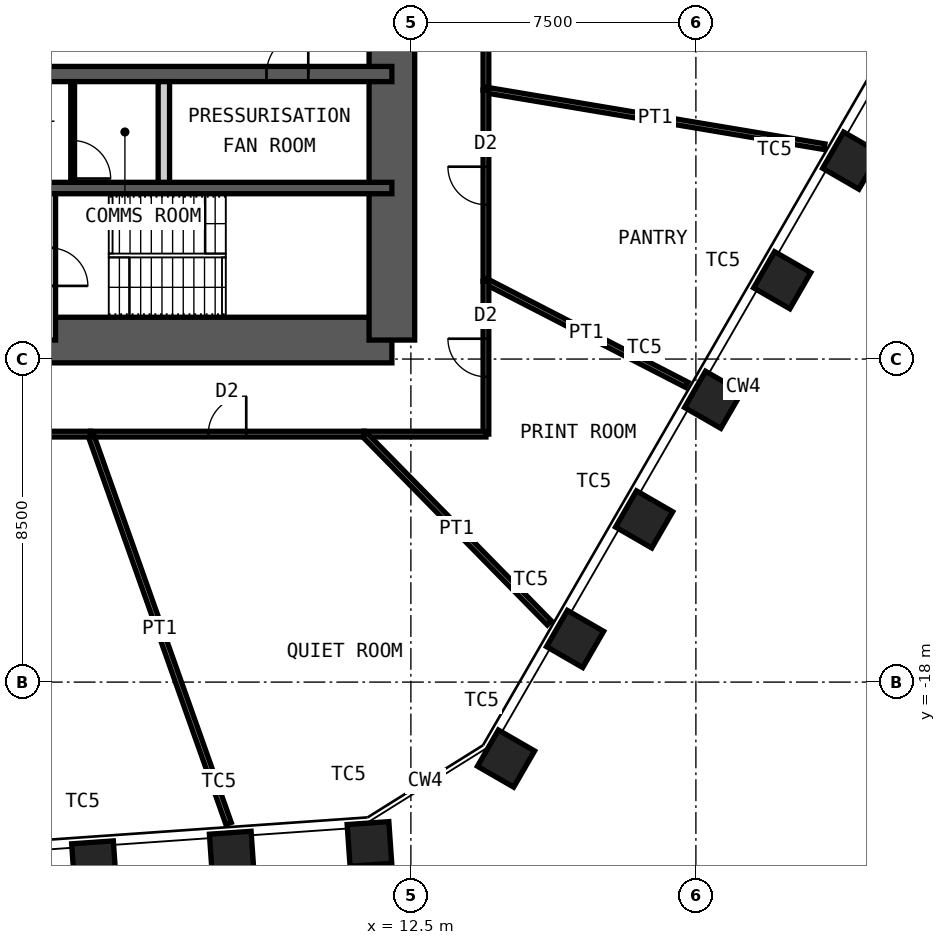
"""IFC4 building model, lengths in metres.
Left out: names, types, materials, properties, quantities, classifications, styles, units other than length and angle.
Written with IfcOpenShell. Run it as: python <this file> out.ifc"""

import sys

from ifc_helpers import new_model, si_unit, direction, frame, frame_2d, origin, origin_2d, place, context, subcontext, project, spatial, rectangle, hollow_rectangle, extrude, element, fill, save


model = new_model("IFC4")
c1 = context("Model", 3, precision=1e-05, world=origin(), true_north=direction((0.0, 1.0)))
c2 = subcontext(c1, "Body", "Model", "MODEL_VIEW")
j1 = project(units=[si_unit("LENGTHUNIT", "METRE"), si_unit("PLANEANGLEUNIT", "RADIAN")], contexts=[c1])
p1 = place(None, origin())
s1 = spatial("IfcSite", under=j1, at=p1, CompositionType="ELEMENT")
p2 = place(p1, origin())
s2 = spatial("IfcBuilding", under=s1, at=p2, CompositionType="ELEMENT")
p3 = place(p2, frame((0.0, 0.0, 193.0)))
s3 = spatial("IfcBuildingStorey", under=s2, at=p3, CompositionType="ELEMENT", Elevation=193.0)
for number, where, z_axis, x_axis in (
    (1, (24.088, -4.279, 0.0), (0.0, 0.0, 1.0), (0.5, 0.866, 0.0)),
    (2, (22.271, -7.426, 0.0), (0.0, 0.0, 1.0), (0.5, 0.866, 0.0)),
    (3, (20.454, -10.572, 0.0), (0.0, 0.0, 1.0), (0.5, 0.866, 0.0)),
    (4, (18.637, -13.719, 0.0), (0.0, 0.0, 1.0), (0.5, 0.866, 0.0)),
    (5, (16.821, -16.866, 0.0), (0.0, 0.0, 1.0), (0.5, 0.866, 0.0)),
    (6, (15.004, -20.012, 0.0), (0.0, 0.0, 1.0), (0.5, 0.866, 0.0)),
    (7, (11.41, -22.258, 0.0), (0.0, 0.0, 1.0), (0.998, 0.07, 0.0)),
    (8, (7.785, -22.512, 0.0), (0.0, 0.0, 1.0), (0.998, 0.07, 0.0)),
    (9, (4.16, -22.765, 0.0), (0.0, 0.0, 1.0), (0.998, 0.07, 0.0)),
):
    element("IfcColumn", number, at=place(p3, frame(where, z_axis=z_axis, x_axis=x_axis)), inside=s3, PredefinedType="COLUMN", context=c2, shape_type="SweptSolid", body=[
        extrude(hollow_rectangle(XDim=1.1, YDim=1.1, WallThickness=0.07, at=origin_2d()), origin(), (0.0, 0.0, 1.0), 4.2),
    ])
p4 = place(p3, frame((-12.0, -9.0, 0.0), z_axis=(0.0, 0.0, 1.0), x_axis=(1.0, 0.0, 0.0)))
e10 = element("IfcWall", 10, at=p4, inside=s3, PredefinedType="SHEAR", context=c2, shape_type="SweptSolid", body=[
    extrude(rectangle(XDim=24.0, YDim=1.2, at=frame_2d((12.0, 0.0))), origin(), (0.0, 0.0, 1.0), 4.2),
])
p5 = place(p4, frame((1.35, 0.0, 0.0)))
e11 = element("IfcOpeningElement", 11, at=p5, cuts=e10, PredefinedType="OPENING", context=c2, shape_type="SweptSolid", body=[
    extrude(rectangle(XDim=1.0, YDim=2.1, at=frame_2d((0.5, 1.05))), frame((0.0, 0.61, 0.0), z_axis=(0.0, -1.0, 0.0), x_axis=(1.0, 0.0, 0.0)), (0.0, 0.0, 1.0), 1.22),
])
p6 = place(p4, frame((5.325, 0.0, 0.0)))
e12 = element("IfcOpeningElement", 12, at=p6, cuts=e10, PredefinedType="OPENING", context=c2, shape_type="SweptSolid", body=[
    extrude(rectangle(XDim=1.15, YDim=2.1, at=frame_2d((0.575, 1.05))), frame((0.0, 0.61, 0.0), z_axis=(0.0, -1.0, 0.0), x_axis=(1.0, 0.0, 0.0)), (0.0, 0.0, 1.0), 1.22),
])
p7 = place(p4, frame((12.6, 0.0, 0.0)))
e13 = element("IfcOpeningElement", 13, at=p7, cuts=e10, PredefinedType="OPENING", context=c2, shape_type="SweptSolid", body=[
    extrude(rectangle(XDim=1.0, YDim=2.1, at=frame_2d((0.5, 1.05))), frame((0.0, 0.61, 0.0), z_axis=(0.0, -1.0, 0.0), x_axis=(1.0, 0.0, 0.0)), (0.0, 0.0, 1.0), 1.22),
])
p8 = place(p3, frame((12.0, -9.0, 0.0), z_axis=(0.0, 0.0, 1.0), x_axis=(0.0, 1.0, 0.0)))
e14 = element("IfcWall", 14, at=p8, inside=s3, PredefinedType="SHEAR", context=c2, shape_type="SweptSolid", body=[
    extrude(rectangle(XDim=18.0, YDim=1.2, at=frame_2d((9.0, 0.0))), origin(), (0.0, 0.0, 1.0), 4.2),
])
p9 = place(p8, frame((8.1, 0.0, 0.0)))
e15 = element("IfcOpeningElement", 15, at=p9, cuts=e14, PredefinedType="OPENING", context=c2, shape_type="SweptSolid", body=[
    extrude(rectangle(XDim=1.8, YDim=2.1, at=frame_2d((0.9, 1.05))), frame((0.0, 0.61, 0.0), z_axis=(0.0, -1.0, 0.0), x_axis=(1.0, 0.0, 0.0)), (0.0, 0.0, 1.0), 1.22),
])
p10 = place(p3, frame((-12.0, -2.0, 0.0), z_axis=(0.0, 0.0, 1.0), x_axis=(1.0, 0.0, 0.0)))
e16 = element("IfcWall", 16, at=p10, inside=s3, PredefinedType="SHEAR", context=c2, shape_type="SweptSolid", body=[
    extrude(rectangle(XDim=24.0, YDim=0.4, at=frame_2d((12.0, 0.0))), origin(), (0.0, 0.0, 1.0), 4.2),
])
p11 = place(p10, frame((1.1, 0.0, 0.0)))
e17 = element("IfcOpeningElement", 17, at=p11, cuts=e16, PredefinedType="OPENING", context=c2, shape_type="SweptSolid", body=[
    extrude(rectangle(XDim=1.1, YDim=2.1, at=frame_2d((0.55, 1.05))), frame((0.0, 0.21, 0.0), z_axis=(0.0, -1.0, 0.0), x_axis=(1.0, 0.0, 0.0)), (0.0, 0.0, 1.0), 0.42),
])
p12 = place(p10, frame((13.55, 0.0, 0.0)))
e18 = element("IfcOpeningElement", 18, at=p12, cuts=e16, PredefinedType="OPENING", context=c2, shape_type="SweptSolid", body=[
    extrude(rectangle(XDim=1.1, YDim=2.1, at=frame_2d((0.55, 1.05))), frame((0.0, 0.21, 0.0), z_axis=(0.0, -1.0, 0.0), x_axis=(1.0, 0.0, 0.0)), (0.0, 0.0, 1.0), 0.42),
])
p13 = place(p10, frame((20.7, 0.0, 0.0)))
e19 = element("IfcOpeningElement", 19, at=p13, cuts=e16, PredefinedType="OPENING", context=c2, shape_type="SweptSolid", body=[
    extrude(rectangle(XDim=1.1, YDim=2.1, at=frame_2d((0.55, 1.05))), frame((0.0, 0.21, 0.0), z_axis=(0.0, -1.0, 0.0), x_axis=(1.0, 0.0, 0.0)), (0.0, 0.0, 1.0), 0.42),
])
p14 = place(p10, frame((4.0, 0.0, 0.0)))
e20 = element("IfcOpeningElement", 20, at=p14, cuts=e16, PredefinedType="OPENING", context=c2, shape_type="SweptSolid", body=[
    extrude(rectangle(XDim=1.0, YDim=2.1, at=frame_2d((0.5, 1.05))), frame((0.0, 0.21, 0.0), z_axis=(0.0, -1.0, 0.0), x_axis=(1.0, 0.0, 0.0)), (0.0, 0.0, 1.0), 0.42),
])
p15 = place(p10, frame((6.8, 0.0, 0.0)))
e21 = element("IfcOpeningElement", 21, at=p15, cuts=e16, PredefinedType="OPENING", context=c2, shape_type="SweptSolid", body=[
    extrude(rectangle(XDim=1.0, YDim=2.1, at=frame_2d((0.5, 1.05))), frame((0.0, 0.21, 0.0), z_axis=(0.0, -1.0, 0.0), x_axis=(1.0, 0.0, 0.0)), (0.0, 0.0, 1.0), 0.42),
])
p16 = place(p3, frame((-12.0, -5.0, 0.0), z_axis=(0.0, 0.0, 1.0), x_axis=(1.0, 0.0, 0.0)))
e22 = element("IfcWall", 22, at=p16, inside=s3, PredefinedType="SHEAR", context=c2, shape_type="SweptSolid", body=[
    extrude(rectangle(XDim=24.0, YDim=0.3, at=frame_2d((12.0, 0.0))), origin(), (0.0, 0.0, 1.0), 4.2),
])
p17 = place(p3, frame((6.0, -4.85, 0.0), z_axis=(0.0, 0.0, 1.0), x_axis=(0.0, 1.0, 0.0)))
e23 = element("IfcWall", 23, at=p17, inside=s3, PredefinedType="PARTITIONING", context=c2, shape_type="SweptSolid", body=[
    extrude(rectangle(XDim=2.65, YDim=0.3, at=frame_2d((1.325, 0.0))), origin(), (0.0, 0.0, 1.0), 3.98),
])
p18 = place(p3, frame((3.0, -9.0, 0.0), z_axis=(0.0, 0.0, 1.0), x_axis=(0.0, 1.0, 0.0)))
e24 = element("IfcWall", 24, at=p18, inside=s3, PredefinedType="PARTITIONING", context=c2, shape_type="SweptSolid", body=[
    extrude(rectangle(XDim=3.85, YDim=0.3, at=frame_2d((1.925, 0.0))), origin(), (0.0, 0.0, 1.0), 3.98),
])
p19 = place(p18, frame((1.425, 0.0, 0.0)))
e25 = element("IfcOpeningElement", 25, at=p19, cuts=e24, PredefinedType="OPENING", context=c2, shape_type="SweptSolid", body=[
    extrude(rectangle(XDim=1.0, YDim=2.1, at=frame_2d((0.5, 1.05))), frame((0.0, 0.16, 0.0), z_axis=(0.0, -1.0, 0.0), x_axis=(1.0, 0.0, 0.0)), (0.0, 0.0, 1.0), 0.32),
])
p20 = place(p3, frame((3.6, -4.85, 0.0), z_axis=(0.0, 0.0, 1.0), x_axis=(0.0, 1.0, 0.0)))
e26 = element("IfcWall", 26, at=p20, inside=s3, PredefinedType="PARTITIONING", context=c2, shape_type="SweptSolid", body=[
    extrude(rectangle(XDim=2.65, YDim=0.1, at=frame_2d((1.325, 0.0))), origin(), (0.0, 0.0, 1.0), 3.98),
])
p21 = place(p20, frame((0.1, 0.0, 0.0)))
e27 = element("IfcOpeningElement", 27, at=p21, cuts=e26, PredefinedType="OPENING", context=c2, shape_type="SweptSolid", body=[
    extrude(rectangle(XDim=1.0, YDim=2.4, at=frame_2d((0.5, 1.2))), frame((0.0, 0.06, 0.0), z_axis=(0.0, -1.0, 0.0), x_axis=(1.0, 0.0, 0.0)), (0.0, 0.0, 1.0), 0.12),
])
p22 = place(p3, frame((14.475, 5.874, 0.0), z_axis=(0.0, 0.0, 1.0), x_axis=(0.0, -1.0, 0.0)))
e28 = element("IfcWall", 28, at=p22, inside=s3, PredefinedType="PARTITIONING", context=c2, shape_type="SweptSolid", body=[
    extrude(rectangle(XDim=8.296, YDim=0.15, at=frame_2d((4.148, 0.0))), origin(), (0.0, 0.0, 1.0), 4.03),
])
p23 = place(p22, frame((3.248, 0.0, 0.0)))
e29 = element("IfcOpeningElement", 29, at=p23, cuts=e28, PredefinedType="OPENING", context=c2, shape_type="SweptSolid", body=[
    extrude(rectangle(XDim=1.8, YDim=2.4, at=frame_2d((0.9, 1.2))), frame((0.0, 0.085, 0.0), z_axis=(0.0, -1.0, 0.0), x_axis=(1.0, 0.0, 0.0)), (0.0, 0.0, 1.0), 0.17),
])
p24 = place(p3, frame((23.383, -3.912, 0.0), z_axis=(0.0, 0.0, 1.0), x_axis=(-0.986293651891, 0.164999491631, 0.0)))
e30 = element("IfcWall", 30, at=p24, inside=s3, PredefinedType="PARTITIONING", context=c2, shape_type="SweptSolid", body=[
    extrude(rectangle(XDim=9.032, YDim=0.15, at=frame_2d((4.516, 0.0))), origin(), (0.0, 0.0, 1.0), 3.43),
])
p25 = place(p3, frame((14.475, -2.422, 0.0), z_axis=(0.0, 0.0, 1.0), x_axis=(0.0, -1.0, 0.0)))
e31 = element("IfcWall", 31, at=p25, inside=s3, PredefinedType="PARTITIONING", context=c2, shape_type="SweptSolid", body=[
    extrude(rectangle(XDim=5.033, YDim=0.15, at=frame_2d((2.517, 0.0))), origin(), (0.0, 0.0, 1.0), 4.03),
])
p26 = place(p25, frame((2.017, 0.0, 0.0)))
e32 = element("IfcOpeningElement", 32, at=p26, cuts=e31, PredefinedType="OPENING", context=c2, shape_type="SweptSolid", body=[
    extrude(rectangle(XDim=1.0, YDim=2.4, at=frame_2d((0.5, 1.2))), frame((0.0, 0.085, 0.0), z_axis=(0.0, -1.0, 0.0), x_axis=(1.0, 0.0, 0.0)), (0.0, 0.0, 1.0), 0.17),
])
p27 = place(p3, frame((19.759, -10.177, 0.0), z_axis=(0.0, 0.0, 1.0), x_axis=(-0.889015092721, 0.457877893017, 0.0)))
e33 = element("IfcWall", 33, at=p27, inside=s3, PredefinedType="PARTITIONING", context=c2, shape_type="SweptSolid", body=[
    extrude(rectangle(XDim=5.944, YDim=0.15, at=frame_2d((2.972, 0.0))), origin(), (0.0, 0.0, 1.0), 3.43),
])
p28 = place(p3, frame((14.475, -7.455, 0.0), z_axis=(0.0, 0.0, 1.0), x_axis=(0.0, -1.0, 0.0)))
e34 = element("IfcWall", 34, at=p28, inside=s3, PredefinedType="PARTITIONING", context=c2, shape_type="SweptSolid", body=[
    extrude(rectangle(XDim=4.02, YDim=0.15, at=frame_2d((2.01, 0.0))), origin(), (0.0, 0.0, 1.0), 4.03),
])
p29 = place(p28, frame((1.51, 0.0, 0.0)))
e35 = element("IfcOpeningElement", 35, at=p29, cuts=e34, PredefinedType="OPENING", context=c2, shape_type="SweptSolid", body=[
    extrude(rectangle(XDim=1.0, YDim=2.4, at=frame_2d((0.5, 1.2))), frame((0.0, 0.085, 0.0), z_axis=(0.0, -1.0, 0.0), x_axis=(1.0, 0.0, 0.0)), (0.0, 0.0, 1.0), 0.17),
])
p30 = place(p3, frame((14.475, -11.475, 0.0), z_axis=(0.0, 0.0, 1.0), x_axis=(-1.0, 0.0, 0.0)))
e36 = element("IfcWall", 36, at=p30, inside=s3, PredefinedType="PARTITIONING", context=c2, shape_type="SweptSolid", body=[
    extrude(rectangle(XDim=3.209, YDim=0.15, at=frame_2d((1.605, 0.0))), origin(), (0.0, 0.0, 1.0), 4.03),
])
p31 = place(p3, frame((16.145, -16.444, 0.0), z_axis=(0.0, 0.0, 1.0), x_axis=(-0.700591378209, 0.71356269576, 0.0)))
e37 = element("IfcWall", 37, at=p31, inside=s3, PredefinedType="PARTITIONING", context=c2, shape_type="SweptSolid", body=[
    extrude(rectangle(XDim=6.964, YDim=0.15, at=frame_2d((3.482, 0.0))), origin(), (0.0, 0.0, 1.0), 3.43),
])
p32 = place(p3, frame((11.266, -11.475, 0.0), z_axis=(0.0, 0.0, 1.0), x_axis=(-1.0, 0.0, 0.0)))
e38 = element("IfcWall", 38, at=p32, inside=s3, PredefinedType="PARTITIONING", context=c2, shape_type="SweptSolid", body=[
    extrude(rectangle(XDim=7.196, YDim=0.15, at=frame_2d((3.598, 0.0))), origin(), (0.0, 0.0, 1.0), 4.03),
])
p33 = place(p32, frame((3.098, 0.0, 0.0)))
e39 = element("IfcOpeningElement", 39, at=p33, cuts=e38, PredefinedType="OPENING", context=c2, shape_type="SweptSolid", body=[
    extrude(rectangle(XDim=1.0, YDim=2.4, at=frame_2d((0.5, 1.2))), frame((0.0, 0.085, 0.0), z_axis=(0.0, -1.0, 0.0), x_axis=(1.0, 0.0, 0.0)), (0.0, 0.0, 1.0), 0.17),
])
p34 = place(p3, frame((7.703, -21.719, 0.0), z_axis=(0.0, 0.0, 1.0), x_axis=(-0.334269551553, 0.942477515331, 0.0)))
e40 = element("IfcWall", 40, at=p34, inside=s3, PredefinedType="PARTITIONING", context=c2, shape_type="SweptSolid", body=[
    extrude(rectangle(XDim=10.869, YDim=0.15, at=frame_2d((5.435, 0.0))), origin(), (0.0, 0.0, 1.0), 3.43),
])
p35 = place(p3, frame((4.07, -11.475, 0.0), z_axis=(0.0, 0.0, 1.0), x_axis=(-1.0, 0.0, 0.0)))
e41 = element("IfcWall", 41, at=p35, inside=s3, PredefinedType="PARTITIONING", context=c2, shape_type="SweptSolid", body=[
    extrude(rectangle(XDim=13.528, YDim=0.15, at=frame_2d((6.764, 0.0))), origin(), (0.0, 0.0, 1.0), 4.03),
])
p36 = place(p35, frame((5.864, 0.0, 0.0)))
e42 = element("IfcOpeningElement", 42, at=p36, cuts=e41, PredefinedType="OPENING", context=c2, shape_type="SweptSolid", body=[
    extrude(rectangle(XDim=1.8, YDim=2.4, at=frame_2d((0.9, 1.2))), frame((0.0, 0.085, 0.0), z_axis=(0.0, -1.0, 0.0), x_axis=(1.0, 0.0, 0.0)), (0.0, 0.0, 1.0), 0.17),
])
p37 = place(p13, origin())
e43 = element("IfcDoor", 43, at=p37, inside=s3, OperationType="SINGLE_SWING_LEFT", PredefinedType="DOOR", context=c2, shape_type="SweptSolid", body=[
    extrude(rectangle(XDim=1.1, YDim=2.1, at=frame_2d((0.55, 1.05))), frame((0.0, 0.025, 0.0), z_axis=(0.0, -1.0, 0.0), x_axis=(1.0, 0.0, 0.0)), (0.0, 0.0, 1.0), 0.05),
])
fill(e19, e43)
p38 = place(p21, origin())
e44 = element("IfcDoor", 44, at=p38, inside=s3, OperationType="SINGLE_SWING_LEFT", PredefinedType="DOOR", context=c2, shape_type="SweptSolid", body=[
    extrude(rectangle(XDim=1.0, YDim=2.4, at=frame_2d((0.5, 1.2))), frame((0.0, 0.025, 0.0), z_axis=(0.0, -1.0, 0.0), x_axis=(1.0, 0.0, 0.0)), (0.0, 0.0, 1.0), 0.05),
])
fill(e27, e44)
p39 = place(p26, origin())
e45 = element("IfcDoor", 45, at=p39, inside=s3, OperationType="SINGLE_SWING_LEFT", PredefinedType="DOOR", context=c2, shape_type="SweptSolid", body=[
    extrude(rectangle(XDim=1.0, YDim=2.4, at=frame_2d((0.5, 1.2))), frame((0.0, 0.025, 0.0), z_axis=(0.0, -1.0, 0.0), x_axis=(1.0, 0.0, 0.0)), (0.0, 0.0, 1.0), 0.05),
])
fill(e32, e45)
p40 = place(p29, origin())
e46 = element("IfcDoor", 46, at=p40, inside=s3, OperationType="SINGLE_SWING_LEFT", PredefinedType="DOOR", context=c2, shape_type="SweptSolid", body=[
    extrude(rectangle(XDim=1.0, YDim=2.4, at=frame_2d((0.5, 1.2))), frame((0.0, 0.025, 0.0), z_axis=(0.0, -1.0, 0.0), x_axis=(1.0, 0.0, 0.0)), (0.0, 0.0, 1.0), 0.05),
])
fill(e35, e46)
p41 = place(p33, origin())
e47 = element("IfcDoor", 47, at=p41, inside=s3, OperationType="SINGLE_SWING_LEFT", PredefinedType="DOOR", context=c2, shape_type="SweptSolid", body=[
    extrude(rectangle(XDim=1.0, YDim=2.4, at=frame_2d((0.5, 1.2))), frame((0.0, 0.025, 0.0), z_axis=(0.0, -1.0, 0.0), x_axis=(1.0, 0.0, 0.0)), (0.0, 0.0, 1.0), 0.05),
])
fill(e39, e47)
save(model, sys.argv[1])
